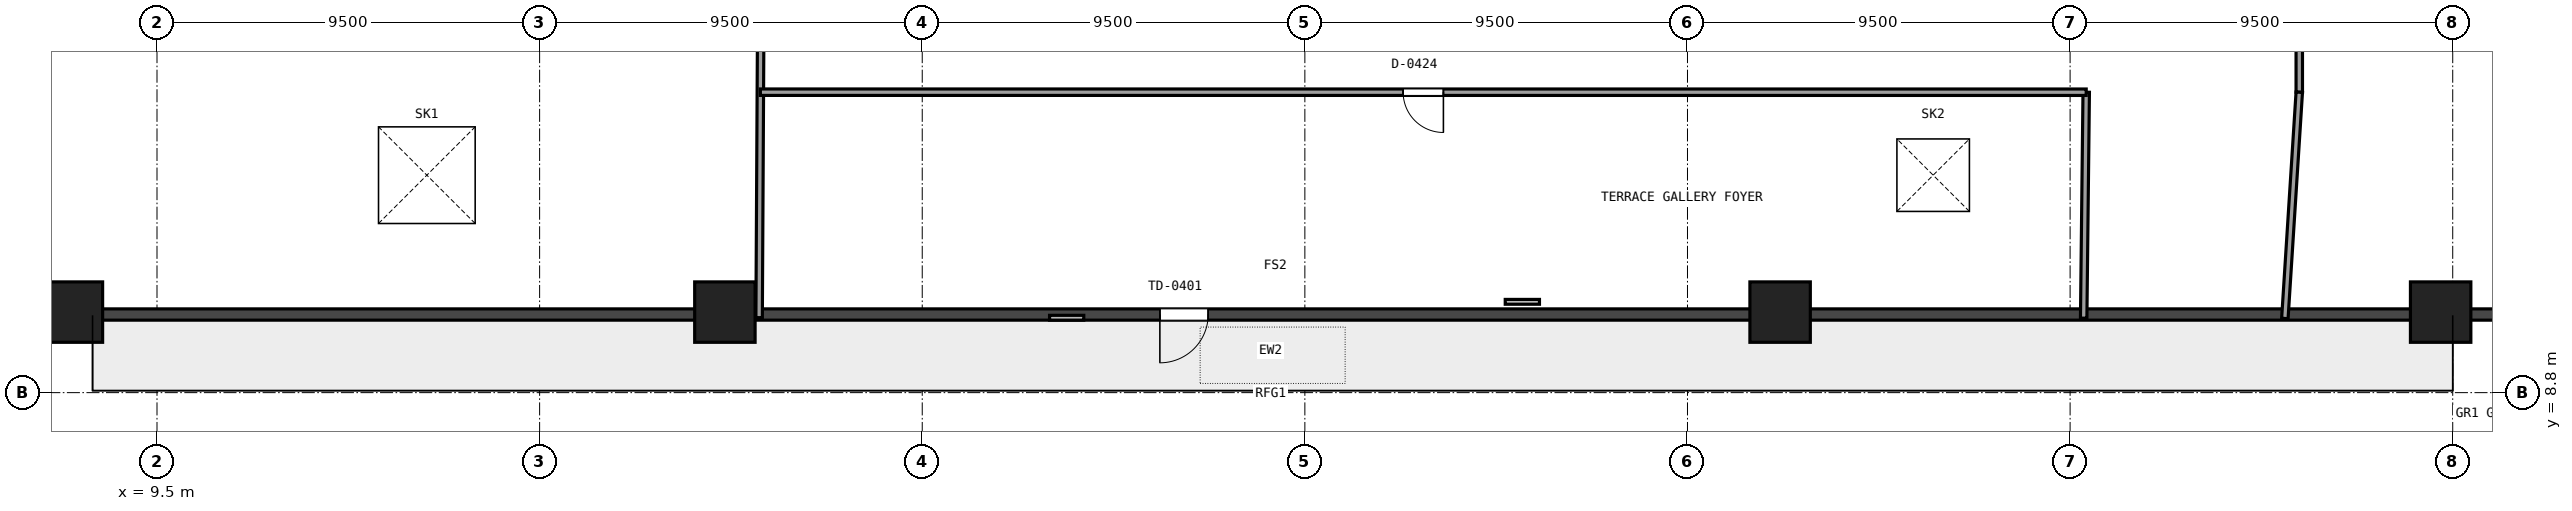
"""IFC4 building model, lengths in metres.
Left out: names, types, materials, properties, quantities, classifications, styles, units other than length and angle.
Written with IfcOpenShell. Run it as: python <this file> out.ifc"""

import sys

from ifc_helpers import new_model, si_unit, direction, frame, frame_2d, origin, origin_2d, place, context, subcontext, project, spatial, rectangle, extrude, element, fill, save


model = new_model("IFC4")
c1 = context("Model", 3, precision=1e-05, world=origin(), true_north=direction((0.0, 1.0)))
c2 = subcontext(c1, "Body", "Model", "MODEL_VIEW")
j1 = project(units=[si_unit("LENGTHUNIT", "METRE"), si_unit("PLANEANGLEUNIT", "RADIAN")], contexts=[c1])
p1 = place(None, origin())
s1 = spatial("IfcSite", under=j1, at=p1, CompositionType="ELEMENT")
p2 = place(p1, origin())
s2 = spatial("IfcBuilding", under=s1, at=p2, CompositionType="ELEMENT")
p3 = place(p2, frame((0.0, 0.0, 21.6)))
s3 = spatial("IfcBuildingStorey", under=s2, at=p3, CompositionType="ELEMENT", Elevation=21.6)
for number, where, z_axis, x_axis in (
    (1, (7.4, 10.8, 0.0), (0.0, 0.0, 1.0), (1.0, 0.0, 0.0)),
    (2, (23.6, 10.8, 0.0), (0.0, 0.0, 1.0), (1.0, 0.0, 0.0)),
    (3, (49.8, 10.8, 0.0), (0.0, 0.0, 1.0), (1.0, 0.0, 0.0)),
    (4, (66.2, 10.8, 0.0), (0.0, 0.0, 1.0), (1.0, 0.0, 0.0)),
):
    element("IfcColumn", number, at=place(p3, frame(where, z_axis=z_axis, x_axis=x_axis)), inside=s3, PredefinedType="COLUMN", context=c2, shape_type="SweptSolid", body=[
        extrude(rectangle(XDim=1.5, YDim=1.5, at=origin_2d()), origin(), (0.0, 0.0, 1.0), 4.98),
    ])
p4 = place(p3, frame((67.86, 10.74, 0.0), z_axis=(0.0, 0.0, 1.0), x_axis=(-1.0, 0.0, 0.0)))
e5 = element("IfcWall", 5, at=p4, inside=s3, PredefinedType="SOLIDWALL", context=c2, shape_type="SweptSolid", body=[
    extrude(rectangle(XDim=61.32, YDim=0.28, at=frame_2d((30.66, 0.0))), origin(), (0.0, 0.0, 1.0), 3.847),
])
p5 = place(p4, frame((32.26, 0.0, 0.0)))
e6 = element("IfcOpeningElement", 6, at=p5, cuts=e5, PredefinedType="OPENING", context=c2, shape_type="SweptSolid", body=[
    extrude(rectangle(XDim=1.2, YDim=2.2, at=frame_2d((0.6, 1.1))), frame((0.0, 0.15, 0.0), z_axis=(0.0, -1.0, 0.0), x_axis=(1.0, 0.0, 0.0)), (0.0, 0.0, 1.0), 0.3),
])
p6 = place(p3, frame((24.45, 10.662, 0.0), z_axis=(0.0, 0.0, 1.0), x_axis=(0.005455756726, 0.999985117249, 0.0)))
e7 = element("IfcWall", 7, at=p6, inside=s3, PredefinedType="PARTITIONING", context=c2, shape_type="SweptSolid", body=[
    extrude(rectangle(XDim=13.738, YDim=0.16, at=frame_2d((6.869, 0.0))), origin(), (0.0, 0.0, 1.0), 3.847),
])
p7 = place(p6, frame((7.245, 0.0, 0.0)))
e8 = element("IfcOpeningElement", 8, at=p7, cuts=e7, PredefinedType="OPENING", context=c2, shape_type="SweptSolid", body=[
    extrude(rectangle(XDim=1.0, YDim=2.15, at=frame_2d((0.5, 1.075))), frame((0.0, 0.09, 0.0), z_axis=(0.0, -1.0, 0.0), x_axis=(1.0, 0.0, 0.0)), (0.0, 0.0, 1.0), 0.18),
])
p8 = place(p3, frame((57.337, 10.649, 0.0), z_axis=(0.0, 0.0, 1.0), x_axis=(0.011224981311, 0.999936997913, 0.0)))
e9 = element("IfcWall", 9, at=p8, inside=s3, PredefinedType="PARTITIONING", context=c2, shape_type="SweptSolid", body=[
    extrude(rectangle(XDim=5.611, YDim=0.16, at=frame_2d((2.806, 0.0))), origin(), (0.0, 0.0, 1.0), 4.121),
])
p9 = place(p3, frame((57.4, 16.26, 0.0), z_axis=(0.0, 0.0, 1.0), x_axis=(-0.99999999956, 2.9665668e-05, 0.0)))
e10 = element("IfcWall", 10, at=p9, inside=s3, PredefinedType="PARTITIONING", context=c2, shape_type="SweptSolid", body=[
    extrude(rectangle(XDim=32.919, YDim=0.16, at=frame_2d((16.459, 0.0))), origin(), (0.0, 0.0, 1.0), 3.847),
])
p10 = place(p9, frame((15.96, 0.0, 0.0)))
e11 = element("IfcOpeningElement", 11, at=p10, cuts=e10, PredefinedType="OPENING", context=c2, shape_type="SweptSolid", body=[
    extrude(rectangle(XDim=1.0, YDim=2.15, at=frame_2d((0.5, 1.075))), frame((0.0, 0.09, 0.0), z_axis=(0.0, -1.0, 0.0), x_axis=(1.0, 0.0, 0.0)), (0.0, 0.0, 1.0), 0.18),
])
p11 = place(p3, frame((62.69, 20.69, 0.0), z_axis=(0.0, 0.0, 1.0), x_axis=(0.0, -1.0, 0.0)))
e12 = element("IfcWall", 12, at=p11, inside=s3, PredefinedType="PARTITIONING", context=c2, shape_type="SweptSolid", body=[
    extrude(rectangle(XDim=4.43, YDim=0.16, at=frame_2d((2.215, 0.0))), origin(), (0.0, 0.0, 1.0), 3.847),
])
p12 = place(p3, frame((62.69, 16.26, 0.0), z_axis=(0.0, 0.0, 1.0), x_axis=(-0.063579763171, -0.997976760108, 0.0)))
e13 = element("IfcWall", 13, at=p12, inside=s3, PredefinedType="PARTITIONING", context=c2, shape_type="SweptSolid", body=[
    extrude(rectangle(XDim=5.629, YDim=0.16, at=frame_2d((2.815, 0.0))), origin(), (0.0, 0.0, 1.0), 4.121),
])
p13 = place(p5, origin())
e14 = element("IfcDoor", 14, at=p13, inside=s3, OperationType="SINGLE_SWING_RIGHT", PredefinedType="DOOR", context=c2, shape_type="SweptSolid", body=[
    extrude(rectangle(XDim=1.2, YDim=2.2, at=frame_2d((0.6, 1.1))), frame((0.0, 0.025, 0.0), z_axis=(0.0, -1.0, 0.0), x_axis=(1.0, 0.0, 0.0)), (0.0, 0.0, 1.0), 0.05),
])
fill(e6, e14)
p14 = place(p3, frame((0.0, 0.0, -0.42)))
p15 = place(p14, frame((16.2, 14.2, 0.0)))
p16 = place(p15, frame((0.0, 0.0, 0.37)))
e15 = element("IfcWindow", 15, at=p16, inside=s3, PartitioningType="SINGLE_PANEL", PredefinedType="SKYLIGHT", context=c2, shape_type="SweptSolid", body=[
    extrude(rectangle(XDim=2.4, YDim=2.4, at=origin_2d()), origin(), (0.0, 0.0, 1.0), 0.05),
])
p17 = place(p14, frame((53.6, 14.2, 0.0)))
p18 = place(p17, frame((0.0, 0.0, 0.37)))
e16 = element("IfcWindow", 16, at=p18, inside=s3, PartitioningType="SINGLE_PANEL", PredefinedType="SKYLIGHT", context=c2, shape_type="SweptSolid", body=[
    extrude(rectangle(XDim=1.8, YDim=1.8, at=origin_2d()), origin(), (0.0, 0.0, 1.0), 0.05),
])
p19 = place(p10, origin())
e17 = element("IfcDoor", 17, at=p19, inside=s3, OperationType="SINGLE_SWING_LEFT", PredefinedType="DOOR", context=c2, shape_type="SweptSolid", body=[
    extrude(rectangle(XDim=1.0, YDim=2.15, at=frame_2d((0.5, 1.075))), frame((0.0, 0.025, 0.0), z_axis=(0.0, -1.0, 0.0), x_axis=(1.0, 0.0, 0.0)), (0.0, 0.0, 1.0), 0.05),
])
fill(e11, e17)
save(model, sys.argv[1])
